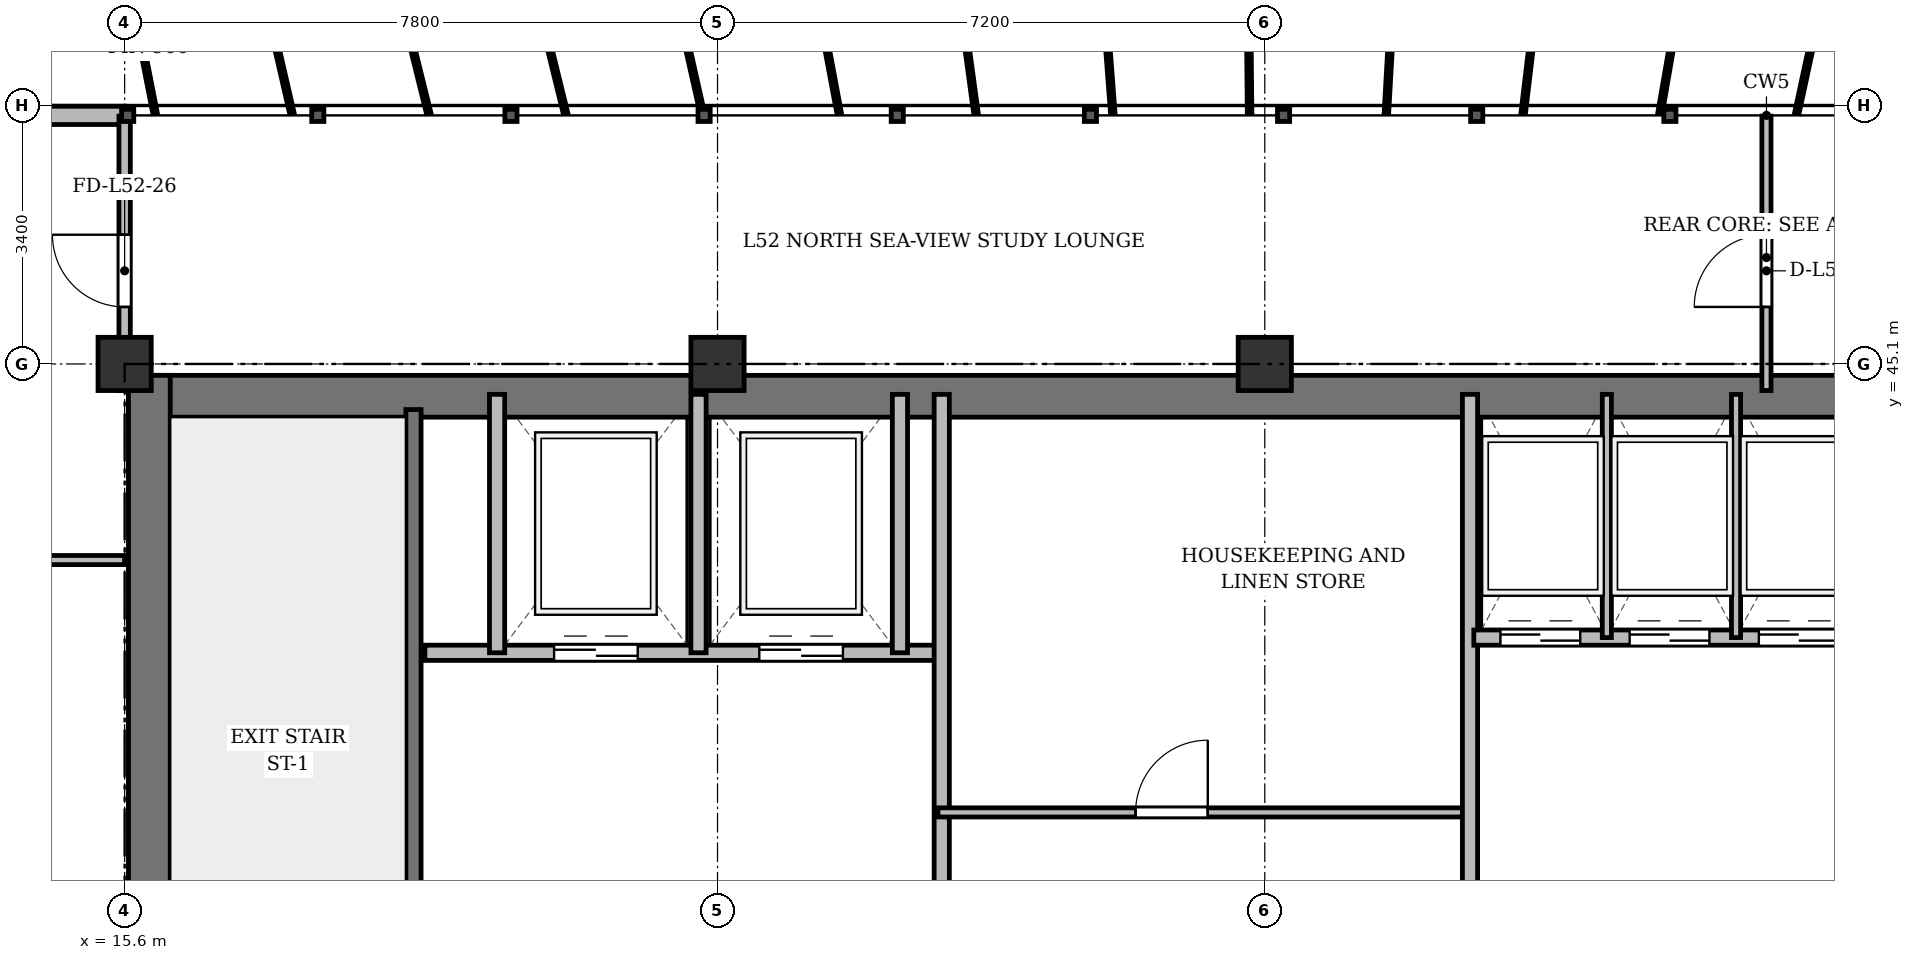
"""IFC4 building model, lengths in metres.
Left out: names, types, materials, properties, quantities, classifications, styles, units other than length and angle.
Written with IfcOpenShell. Run it as: python <this file> out.ifc"""

import sys

from ifc_helpers import new_model, si_unit, direction, frame, frame_2d, origin, origin_2d, place, context, subcontext, project, spatial, rectangle, extrude, source, transform, mapped, element, fill, save


model = new_model("IFC4")
c1 = context("Model", 3, precision=1e-05, world=origin(), true_north=direction((0.0, 1.0)))
c2 = subcontext(c1, "Body", "Model", "MODEL_VIEW")
j1 = project(units=[si_unit("LENGTHUNIT", "METRE"), si_unit("PLANEANGLEUNIT", "RADIAN")], contexts=[c1])
p1 = place(None, origin())
s1 = spatial("IfcSite", under=j1, at=p1, CompositionType="ELEMENT")
p2 = place(p1, origin())
s2 = spatial("IfcBuilding", under=s1, at=p2, CompositionType="ELEMENT")
p3 = place(p2, frame((0.0, 0.0, 201.3)))
s3 = spatial("IfcBuildingStorey", under=s2, at=p3, CompositionType="ELEMENT", Elevation=201.3)
m1 = source(origin(), c2, "Body", "SweptSolid", [
    extrude(rectangle(XDim=0.7, YDim=0.7, at=origin_2d()), origin(), (0.0, 0.0, 1.0), 3.6),
])
for number, where, z_axis, x_axis in (
    (1, (15.6, 45.1, 0.0), (0.0, 0.0, 1.0), (1.0, 0.0, 0.0)),
    (2, (23.4, 45.1, 0.0), (0.0, 0.0, 1.0), (1.0, 0.0, 0.0)),
    (3, (30.6, 45.1, 0.0), (0.0, 0.0, 1.0), (1.0, 0.0, 0.0)),
):
    element("IfcColumn", number, at=place(p3, frame(where, z_axis=z_axis, x_axis=x_axis)), inside=s3, PredefinedType="COLUMN", context=c2, shape_type="MappedRepresentation", body=[
        mapped(m1, transform((0.0, 0.0, 0.0), x_axis=(1.0, 0.0, 0.0), y_axis=(0.0, 1.0, 0.0), z_axis=(0.0, 0.0, 1.0), scale=1.0)),
    ])
p4 = place(p3, frame((11.1, 48.37, 0.0), z_axis=(0.0, 0.0, 1.0), x_axis=(1.0, 0.0, 0.0)))
e4 = element("IfcWall", 4, at=p4, inside=s3, PredefinedType="SOLIDWALL", context=c2, shape_type="SweptSolid", body=[
    extrude(rectangle(XDim=4.5, YDim=0.24, at=frame_2d((2.25, 0.0))), origin(), (0.0, 0.0, 1.0), 3.22),
])
p5 = place(p4, frame((1.983, 0.0, 0.9)))
e5 = element("IfcOpeningElement", 5, at=p5, cuts=e4, PredefinedType="OPENING", context=c2, shape_type="SweptSolid", body=[
    extrude(rectangle(XDim=1.2, YDim=1.65, at=frame_2d((0.6, 0.825))), frame((0.0, 0.13, 0.0), z_axis=(0.0, -1.0, 0.0), x_axis=(1.0, 0.0, 0.0)), (0.0, 0.0, 1.0), 0.26),
])
p6 = place(p3, frame((15.65, 44.675, 0.0), z_axis=(0.0, 0.0, 1.0), x_axis=(1.0, 0.0, 0.0)))
e6 = element("IfcWall", 6, at=p6, inside=s3, PredefinedType="SHEAR", context=c2, shape_type="SweptSolid", body=[
    extrude(rectangle(XDim=43.1, YDim=0.55, at=frame_2d((21.55, 0.0))), origin(), (0.0, 0.0, 1.0), 3.22),
])
p7 = place(p3, frame((15.925, 33.4, 0.0), z_axis=(0.0, 0.0, 1.0), x_axis=(0.0, 1.0, 0.0)))
e7 = element("IfcWall", 7, at=p7, inside=s3, PredefinedType="SHEAR", context=c2, shape_type="SweptSolid", body=[
    extrude(rectangle(XDim=11.55, YDim=0.55, at=frame_2d((5.775, 0.0))), origin(), (0.0, 0.0, 1.0), 3.22),
])
p8 = place(p3, frame((19.4, 33.4, 0.0), z_axis=(0.0, 0.0, 1.0), x_axis=(0.0, 1.0, 0.0)))
e8 = element("IfcWall", 8, at=p8, inside=s3, PredefinedType="SHEAR", context=c2, shape_type="SweptSolid", body=[
    extrude(rectangle(XDim=11.1, YDim=0.2, at=frame_2d((5.55, 0.0))), origin(), (0.0, 0.0, 1.0), 3.22),
])
p9 = place(p8, frame((0.85, 0.0, 0.0)))
e9 = element("IfcOpeningElement", 9, at=p9, cuts=e8, PredefinedType="OPENING", context=c2, shape_type="SweptSolid", body=[
    extrude(rectangle(XDim=1.1, YDim=2.15, at=frame_2d((0.55, 1.075))), frame((0.0, 0.11, 0.0), z_axis=(0.0, -1.0, 0.0), x_axis=(1.0, 0.0, 0.0)), (0.0, 0.0, 1.0), 0.22),
])
p10 = place(p3, frame((19.55, 41.3, 0.0), z_axis=(0.0, 0.0, 1.0), x_axis=(1.0, 0.0, 0.0)))
e10 = element("IfcWall", 10, at=p10, inside=s3, PredefinedType="SOLIDWALL", context=c2, shape_type="SweptSolid", body=[
    extrude(rectangle(XDim=6.75, YDim=0.2, at=frame_2d((3.375, 0.0))), origin(), (0.0, 0.0, 1.0), 3.22),
])
p11 = place(p10, frame((1.7, 0.0, 0.0)))
e11 = element("IfcOpeningElement", 11, at=p11, cuts=e10, PredefinedType="OPENING", context=c2, shape_type="SweptSolid", body=[
    extrude(rectangle(XDim=1.1, YDim=2.15, at=frame_2d((0.55, 1.075))), frame((0.0, 0.11, 0.0), z_axis=(0.0, -1.0, 0.0), x_axis=(1.0, 0.0, 0.0)), (0.0, 0.0, 1.0), 0.22),
])
p12 = place(p10, frame((4.4, 0.0, 0.0)))
e12 = element("IfcOpeningElement", 12, at=p12, cuts=e10, PredefinedType="OPENING", context=c2, shape_type="SweptSolid", body=[
    extrude(rectangle(XDim=1.1, YDim=2.15, at=frame_2d((0.55, 1.075))), frame((0.0, 0.11, 0.0), z_axis=(0.0, -1.0, 0.0), x_axis=(1.0, 0.0, 0.0)), (0.0, 0.0, 1.0), 0.22),
])
for number, where, z_axis, x_axis in (
    (13, (20.5, 41.3, 0.0), (0.0, 0.0, 1.0), (0.0, 1.0, 0.0)),
    (14, (23.15, 41.3, 0.0), (0.0, 0.0, 1.0), (0.0, 1.0, 0.0)),
    (15, (25.8, 41.3, 0.0), (0.0, 0.0, 1.0), (0.0, 1.0, 0.0)),
):
    element("IfcWall", number, at=place(p3, frame(where, z_axis=z_axis, x_axis=x_axis)), inside=s3, PredefinedType="SOLIDWALL", context=c2, shape_type="SweptSolid", body=[
        extrude(rectangle(XDim=3.4, YDim=0.2, at=frame_2d((1.7, 0.0))), origin(), (0.0, 0.0, 1.0), 3.22),
    ])
p13 = place(p3, frame((26.35, 33.4, 0.0), z_axis=(0.0, 0.0, 1.0), x_axis=(0.0, 1.0, 0.0)))
e16 = element("IfcWall", 16, at=p13, inside=s3, PredefinedType="SOLIDWALL", context=c2, shape_type="SweptSolid", body=[
    extrude(rectangle(XDim=11.3, YDim=0.2, at=frame_2d((5.65, 0.0))), origin(), (0.0, 0.0, 1.0), 2.77),
])
p14 = place(p3, frame((26.3, 39.2, 0.0), z_axis=(0.0, 0.0, 1.0), x_axis=(1.0, 0.0, 0.0)))
e17 = element("IfcWall", 17, at=p14, inside=s3, PredefinedType="PARTITIONING", context=c2, shape_type="SweptSolid", body=[
    extrude(rectangle(XDim=7.0, YDim=0.12, at=frame_2d((3.5, 0.0))), origin(), (0.0, 0.0, 1.0), 2.72),
])
p15 = place(p14, frame((2.6, 0.0, 0.0)))
e18 = element("IfcOpeningElement", 18, at=p15, cuts=e17, PredefinedType="OPENING", context=c2, shape_type="SweptSolid", body=[
    extrude(rectangle(XDim=0.95, YDim=2.15, at=frame_2d((0.475, 1.075))), frame((0.0, 0.07, 0.0), z_axis=(0.0, -1.0, 0.0), x_axis=(1.0, 0.0, 0.0)), (0.0, 0.0, 1.0), 0.14),
])
p16 = place(p3, frame((33.3, 33.4, 0.0), z_axis=(0.0, 0.0, 1.0), x_axis=(0.0, 1.0, 0.0)))
e19 = element("IfcWall", 19, at=p16, inside=s3, PredefinedType="SOLIDWALL", context=c2, shape_type="SweptSolid", body=[
    extrude(rectangle(XDim=11.3, YDim=0.2, at=frame_2d((5.65, 0.0))), origin(), (0.0, 0.0, 1.0), 2.77),
])
p17 = place(p3, frame((33.35, 41.5, 0.0), z_axis=(0.0, 0.0, 1.0), x_axis=(1.0, 0.0, 0.0)))
e20 = element("IfcWall", 20, at=p17, inside=s3, PredefinedType="SOLIDWALL", context=c2, shape_type="SweptSolid", body=[
    extrude(rectangle(XDim=6.9, YDim=0.2, at=frame_2d((3.45, 0.0))), origin(), (0.0, 0.0, 1.0), 3.22),
])
p18 = place(p17, frame((0.35, 0.0, 0.0)))
e21 = element("IfcOpeningElement", 21, at=p18, cuts=e20, PredefinedType="OPENING", context=c2, shape_type="SweptSolid", body=[
    extrude(rectangle(XDim=1.05, YDim=2.15, at=frame_2d((0.525, 1.075))), frame((0.0, 0.11, 0.0), z_axis=(0.0, -1.0, 0.0), x_axis=(1.0, 0.0, 0.0)), (0.0, 0.0, 1.0), 0.22),
])
p19 = place(p17, frame((2.05, 0.0, 0.0)))
e22 = element("IfcOpeningElement", 22, at=p19, cuts=e20, PredefinedType="OPENING", context=c2, shape_type="SweptSolid", body=[
    extrude(rectangle(XDim=1.05, YDim=2.15, at=frame_2d((0.525, 1.075))), frame((0.0, 0.11, 0.0), z_axis=(0.0, -1.0, 0.0), x_axis=(1.0, 0.0, 0.0)), (0.0, 0.0, 1.0), 0.22),
])
p20 = place(p17, frame((3.75, 0.0, 0.0)))
e23 = element("IfcOpeningElement", 23, at=p20, cuts=e20, PredefinedType="OPENING", context=c2, shape_type="SweptSolid", body=[
    extrude(rectangle(XDim=1.05, YDim=2.15, at=frame_2d((0.525, 1.075))), frame((0.0, 0.11, 0.0), z_axis=(0.0, -1.0, 0.0), x_axis=(1.0, 0.0, 0.0)), (0.0, 0.0, 1.0), 0.22),
])
p21 = place(p17, frame((5.45, 0.0, 0.0)))
e24 = element("IfcOpeningElement", 24, at=p21, cuts=e20, PredefinedType="OPENING", context=c2, shape_type="SweptSolid", body=[
    extrude(rectangle(XDim=1.05, YDim=2.15, at=frame_2d((0.525, 1.075))), frame((0.0, 0.11, 0.0), z_axis=(0.0, -1.0, 0.0), x_axis=(1.0, 0.0, 0.0)), (0.0, 0.0, 1.0), 0.22),
])
for number, where, z_axis, x_axis in (
    (25, (35.1, 41.5, 0.0), (0.0, 0.0, 1.0), (0.0, 1.0, 0.0)),
    (26, (36.8, 41.5, 0.0), (0.0, 0.0, 1.0), (0.0, 1.0, 0.0)),
):
    element("IfcWall", number, at=place(p3, frame(where, z_axis=z_axis, x_axis=x_axis)), inside=s3, PredefinedType="PARTITIONING", context=c2, shape_type="SweptSolid", body=[
        extrude(rectangle(XDim=3.2, YDim=0.12, at=frame_2d((1.6, 0.0))), origin(), (0.0, 0.0, 1.0), 3.22),
    ])
p22 = place(p3, frame((11.925, 42.52, 0.0), z_axis=(0.0, 0.0, 1.0), x_axis=(1.0, 0.0, 0.0)))
e27 = element("IfcWall", 27, at=p22, inside=s3, PredefinedType="PARTITIONING", context=c2, shape_type="SweptSolid", body=[
    extrude(rectangle(XDim=3.675, YDim=0.12, at=frame_2d((1.837, 0.0))), origin(), (0.0, 0.0, 1.0), 2.72),
])
p23 = place(p22, frame((1.362, 0.0, 0.0)))
e28 = element("IfcOpeningElement", 28, at=p23, cuts=e27, PredefinedType="OPENING", context=c2, shape_type="SweptSolid", body=[
    extrude(rectangle(XDim=0.95, YDim=2.15, at=frame_2d((0.475, 1.075))), frame((0.0, 0.07, 0.0), z_axis=(0.0, -1.0, 0.0), x_axis=(1.0, 0.0, 0.0)), (0.0, 0.0, 1.0), 0.14),
])
p24 = place(p3, frame((37.2, 44.75, 0.0), z_axis=(0.0, 0.0, 1.0), x_axis=(0.0, 1.0, 0.0)))
e29 = element("IfcWall", 29, at=p24, inside=s3, PredefinedType="PARTITIONING", context=c2, shape_type="SweptSolid", body=[
    extrude(rectangle(XDim=3.61, YDim=0.12, at=frame_2d((1.805, 0.0))), origin(), (0.0, 0.0, 1.0), 2.77),
])
p25 = place(p24, frame((1.1, 0.0, 0.0)))
e30 = element("IfcOpeningElement", 30, at=p25, cuts=e29, PredefinedType="OPENING", context=c2, shape_type="SweptSolid", body=[
    extrude(rectangle(XDim=0.95, YDim=2.15, at=frame_2d((0.475, 1.075))), frame((0.0, 0.07, 0.0), z_axis=(0.0, -1.0, 0.0), x_axis=(1.0, 0.0, 0.0)), (0.0, 0.0, 1.0), 0.14),
])
p26 = place(p3, frame((15.6, 44.75, 0.0), z_axis=(0.0, 0.0, 1.0), x_axis=(0.0, 1.0, 0.0)))
e31 = element("IfcWall", 31, at=p26, inside=s3, PredefinedType="PARTITIONING", context=c2, shape_type="SweptSolid", body=[
    extrude(rectangle(XDim=3.61, YDim=0.15, at=frame_2d((1.805, 0.0))), origin(), (0.0, 0.0, 1.0), 2.72),
])
p27 = place(p26, frame((1.1, 0.0, 0.0)))
e32 = element("IfcOpeningElement", 32, at=p27, cuts=e31, PredefinedType="OPENING", context=c2, shape_type="SweptSolid", body=[
    extrude(rectangle(XDim=0.95, YDim=2.15, at=frame_2d((0.475, 1.075))), frame((0.0, 0.085, 0.0), z_axis=(0.0, -1.0, 0.0), x_axis=(1.0, 0.0, 0.0)), (0.0, 0.0, 1.0), 0.17),
])
m2 = source(origin(), c2, "Body", "SweptSolid", [
    extrude(rectangle(XDim=1.1, YDim=2.15, at=frame_2d((0.55, 1.075))), frame((0.0, 0.025, 0.0), z_axis=(0.0, -1.0, 0.0), x_axis=(1.0, 0.0, 0.0)), (0.0, 0.0, 1.0), 0.05),
])
p28 = place(p11, origin())
e33 = element("IfcDoor", 33, at=p28, inside=s3, OperationType="DOUBLE_DOOR_SLIDING", PredefinedType="DOOR", context=c2, shape_type="MappedRepresentation", body=[
    mapped(m2, transform((0.0, 0.0, 0.0), x_axis=(1.0, 0.0, 0.0), y_axis=(0.0, 1.0, 0.0), z_axis=(0.0, 0.0, 1.0), scale=1.0)),
])
fill(e11, e33)
p29 = place(p12, origin())
e34 = element("IfcDoor", 34, at=p29, inside=s3, OperationType="DOUBLE_DOOR_SLIDING", PredefinedType="DOOR", context=c2, shape_type="MappedRepresentation", body=[
    mapped(m2, transform((0.0, 0.0, 0.0), x_axis=(1.0, 0.0, 0.0), y_axis=(0.0, 1.0, 0.0), z_axis=(0.0, 0.0, 1.0), scale=1.0)),
])
fill(e12, e34)
m3 = source(origin(), c2, "Body", "SweptSolid", [
    extrude(rectangle(XDim=0.95, YDim=2.15, at=frame_2d((0.475, 1.075))), frame((0.0, 0.025, 0.0), z_axis=(0.0, -1.0, 0.0), x_axis=(1.0, 0.0, 0.0)), (0.0, 0.0, 1.0), 0.05),
])
p30 = place(p15, origin())
e35 = element("IfcDoor", 35, at=p30, inside=s3, OperationType="SINGLE_SWING_RIGHT", PredefinedType="DOOR", context=c2, shape_type="MappedRepresentation", body=[
    mapped(m3, transform((0.0, 0.0, 0.0), x_axis=(1.0, 0.0, 0.0), y_axis=(0.0, 1.0, 0.0), z_axis=(0.0, 0.0, 1.0), scale=1.0)),
])
fill(e18, e35)
m4 = source(origin(), c2, "Body", "SweptSolid", [
    extrude(rectangle(XDim=1.05, YDim=2.15, at=frame_2d((0.525, 1.075))), frame((0.0, 0.025, 0.0), z_axis=(0.0, -1.0, 0.0), x_axis=(1.0, 0.0, 0.0)), (0.0, 0.0, 1.0), 0.05),
])
p31 = place(p18, origin())
e36 = element("IfcDoor", 36, at=p31, inside=s3, OperationType="DOUBLE_DOOR_SLIDING", PredefinedType="DOOR", context=c2, shape_type="MappedRepresentation", body=[
    mapped(m4, transform((0.0, 0.0, 0.0), x_axis=(1.0, 0.0, 0.0), y_axis=(0.0, 1.0, 0.0), z_axis=(0.0, 0.0, 1.0), scale=1.0)),
])
fill(e21, e36)
p32 = place(p19, origin())
e37 = element("IfcDoor", 37, at=p32, inside=s3, OperationType="DOUBLE_DOOR_SLIDING", PredefinedType="DOOR", context=c2, shape_type="MappedRepresentation", body=[
    mapped(m4, transform((0.0, 0.0, 0.0), x_axis=(1.0, 0.0, 0.0), y_axis=(0.0, 1.0, 0.0), z_axis=(0.0, 0.0, 1.0), scale=1.0)),
])
fill(e22, e37)
p33 = place(p20, origin())
e38 = element("IfcDoor", 38, at=p33, inside=s3, OperationType="DOUBLE_DOOR_SLIDING", PredefinedType="DOOR", context=c2, shape_type="MappedRepresentation", body=[
    mapped(m4, transform((0.0, 0.0, 0.0), x_axis=(1.0, 0.0, 0.0), y_axis=(0.0, 1.0, 0.0), z_axis=(0.0, 0.0, 1.0), scale=1.0)),
])
fill(e23, e38)
p34 = place(p25, origin())
e39 = element("IfcDoor", 39, at=p34, inside=s3, OperationType="SINGLE_SWING_LEFT", PredefinedType="DOOR", context=c2, shape_type="MappedRepresentation", body=[
    mapped(m3, transform((0.0, 0.0, 0.0), x_axis=(1.0, 0.0, 0.0), y_axis=(0.0, 1.0, 0.0), z_axis=(0.0, 0.0, 1.0), scale=1.0)),
])
fill(e30, e39)
p35 = place(p27, origin())
e40 = element("IfcDoor", 40, at=p35, inside=s3, OperationType="SINGLE_SWING_RIGHT", PredefinedType="DOOR", context=c2, shape_type="MappedRepresentation", body=[
    mapped(m3, transform((0.0, 0.0, 0.0), x_axis=(1.0, 0.0, 0.0), y_axis=(0.0, 1.0, 0.0), z_axis=(0.0, 0.0, 1.0), scale=1.0)),
])
fill(e32, e40)
save(model, sys.argv[1])
